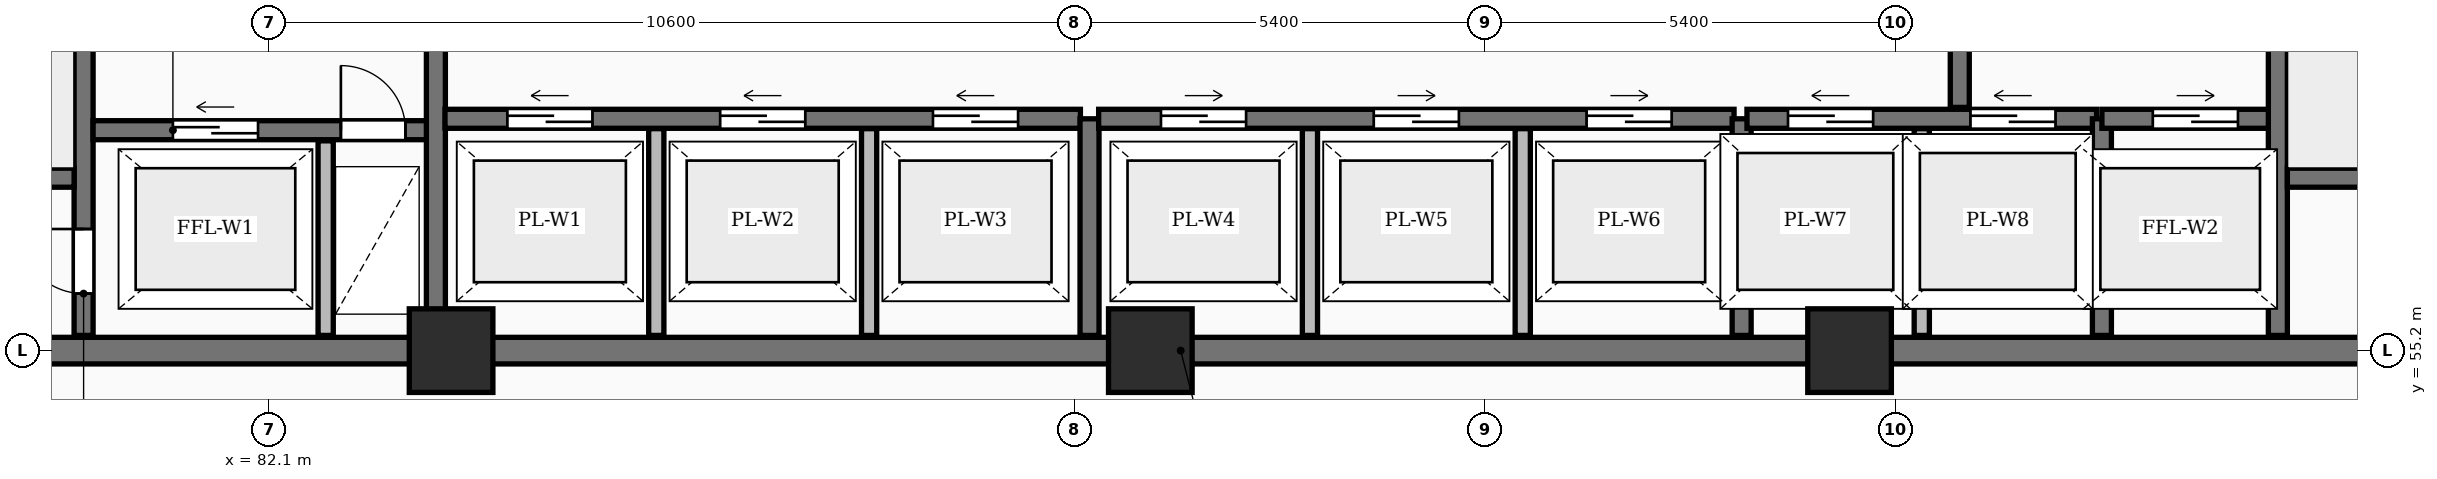
"""IFC4 building model, lengths in metres.
Left out: names, types, materials, properties, quantities, classifications, styles, units other than length and angle.
Written with IfcOpenShell. Run it as: python <this file> out.ifc"""

import sys

from ifc_helpers import new_model, si_unit, direction, frame, frame_2d, origin, origin_2d, place, context, subcontext, project, spatial, rectangle, extrude, element, fill, save


model = new_model("IFC4")
c1 = context("Model", 3, precision=1e-05, world=origin(), true_north=direction((0.0, 1.0)))
c2 = subcontext(c1, "Body", "Model", "MODEL_VIEW")
j1 = project(units=[si_unit("LENGTHUNIT", "METRE"), si_unit("PLANEANGLEUNIT", "RADIAN")], contexts=[c1])
p1 = place(None, origin())
s1 = spatial("IfcSite", under=j1, at=p1, CompositionType="ELEMENT")
p2 = place(p1, origin())
s2 = spatial("IfcBuilding", under=s1, at=p2, CompositionType="ELEMENT")
p3 = place(p2, origin())
s3 = spatial("IfcBuildingStorey", under=s2, at=p3, CompositionType="ELEMENT", Elevation=0.0)
for number, where, z_axis, x_axis in (
    (1, (84.5, 55.2, 0.0), (0.0, 0.0, 1.0), (1.0, 0.0, 0.0)),
    (2, (93.7, 55.2, 0.0), (0.0, 0.0, 1.0), (1.0, 0.0, 0.0)),
    (3, (102.9, 55.2, 0.0), (0.0, 0.0, 1.0), (1.0, 0.0, 0.0)),
):
    element("IfcColumn", number, at=place(p3, frame(where, z_axis=z_axis, x_axis=x_axis)), inside=s3, PredefinedType="COLUMN", context=c2, shape_type="SweptSolid", body=[
        extrude(rectangle(XDim=1.1, YDim=1.1, at=origin_2d()), origin(), (0.0, 0.0, 1.0), 5.4),
    ])
p4 = place(p3, frame((75.95, 55.2, 0.0), z_axis=(0.0, 0.0, 1.0), x_axis=(1.0, 0.0, 0.0)))
e4 = element("IfcWall", 4, at=p4, inside=s3, PredefinedType="SHEAR", context=c2, shape_type="SweptSolid", body=[
    extrude(rectangle(XDim=36.3, YDim=0.35, at=frame_2d((18.15, 0.0))), origin(), (0.0, 0.0, 1.0), 5.4),
])
p5 = place(p3, frame((79.665, 55.4, 0.0), z_axis=(0.0, 0.0, 1.0), x_axis=(0.0, 1.0, 0.0)))
e5 = element("IfcWall", 5, at=p5, inside=s3, PredefinedType="SHEAR", context=c2, shape_type="SweptSolid", body=[
    extrude(rectangle(XDim=11.6, YDim=0.25, at=frame_2d((5.8, 0.0))), origin(), (0.0, 0.0, 1.0), 5.4),
])
p6 = place(p5, frame((0.55, 0.0, 0.0)))
e6 = element("IfcOpeningElement", 6, at=p6, cuts=e5, PredefinedType="OPENING", context=c2, shape_type="SweptSolid", body=[
    extrude(rectangle(XDim=0.85, YDim=2.05, at=frame_2d((0.425, 1.025))), frame((0.0, 0.135, 0.0), z_axis=(0.0, -1.0, 0.0), x_axis=(1.0, 0.0, 0.0)), (0.0, 0.0, 1.0), 0.27),
])
p7 = place(p5, frame((8.4, 0.0, 0.0)))
e7 = element("IfcOpeningElement", 7, at=p7, cuts=e5, PredefinedType="OPENING", context=c2, shape_type="SweptSolid", body=[
    extrude(rectangle(XDim=1.1, YDim=2.1, at=frame_2d((0.55, 1.05))), frame((0.0, 0.135, 0.0), z_axis=(0.0, -1.0, 0.0), x_axis=(1.0, 0.0, 0.0)), (0.0, 0.0, 1.0), 0.27),
])
p8 = place(p5, frame((10.25, 0.0, 0.0)))
e8 = element("IfcOpeningElement", 8, at=p8, cuts=e5, PredefinedType="OPENING", context=c2, shape_type="SweptSolid", body=[
    extrude(rectangle(XDim=0.85, YDim=2.05, at=frame_2d((0.425, 1.025))), frame((0.0, 0.135, 0.0), z_axis=(0.0, -1.0, 0.0), x_axis=(1.0, 0.0, 0.0)), (0.0, 0.0, 1.0), 0.27),
])
p9 = place(p3, frame((76.3, 57.475, 0.0), z_axis=(0.0, 0.0, 1.0), x_axis=(1.0, 0.0, 0.0)))
e9 = element("IfcWall", 9, at=p9, inside=s3, PredefinedType="SHEAR", context=c2, shape_type="SweptSolid", body=[
    extrude(rectangle(XDim=3.24, YDim=0.25, at=frame_2d((1.62, 0.0))), origin(), (0.0, 0.0, 1.0), 5.4),
])
p10 = place(p3, frame((79.79, 58.1, 0.0), z_axis=(0.0, 0.0, 1.0), x_axis=(1.0, 0.0, 0.0)))
e10 = element("IfcWall", 10, at=p10, inside=s3, PredefinedType="SHEAR", context=c2, shape_type="SweptSolid", body=[
    extrude(rectangle(XDim=4.39, YDim=0.25, at=frame_2d((2.195, 0.0))), origin(), (0.0, 0.0, 1.0), 5.4),
])
p11 = place(p10, frame((1.05, 0.0, 0.0)))
e11 = element("IfcOpeningElement", 11, at=p11, cuts=e10, PredefinedType="OPENING", context=c2, shape_type="SweptSolid", body=[
    extrude(rectangle(XDim=1.12, YDim=2.12, at=frame_2d((0.56, 1.06))), frame((0.0, 0.135, 0.0), z_axis=(0.0, -1.0, 0.0), x_axis=(1.0, 0.0, 0.0)), (0.0, 0.0, 1.0), 0.27),
])
p12 = place(p10, frame((3.26, 0.0, 0.0)))
e12 = element("IfcOpeningElement", 12, at=p12, cuts=e10, PredefinedType="OPENING", context=c2, shape_type="SweptSolid", body=[
    extrude(rectangle(XDim=0.85, YDim=2.05, at=frame_2d((0.425, 1.025))), frame((0.0, 0.135, 0.0), z_axis=(0.0, -1.0, 0.0), x_axis=(1.0, 0.0, 0.0)), (0.0, 0.0, 1.0), 0.27),
])
p13 = place(p3, frame((82.85, 55.4, 0.0), z_axis=(0.0, 0.0, 1.0), x_axis=(0.0, 1.0, 0.0)))
e13 = element("IfcWall", 13, at=p13, inside=s3, PredefinedType="PARTITIONING", context=c2, shape_type="SweptSolid", body=[
    extrude(rectangle(XDim=2.56, YDim=0.2, at=frame_2d((1.28, 0.0))), origin(), (0.0, 0.0, 1.0), 5.1),
])
p14 = place(p3, frame((84.3, 55.4, 0.0), z_axis=(0.0, 0.0, 1.0), x_axis=(0.0, 1.0, 0.0)))
e14 = element("IfcWall", 14, at=p14, inside=s3, PredefinedType="SHEAR", context=c2, shape_type="SweptSolid", body=[
    extrude(rectangle(XDim=11.6, YDim=0.25, at=frame_2d((5.8, 0.0))), origin(), (0.0, 0.0, 1.0), 5.4),
])
p15 = place(p14, frame((5.2, 0.0, 0.0)))
e15 = element("IfcOpeningElement", 15, at=p15, cuts=e14, PredefinedType="OPENING", context=c2, shape_type="SweptSolid", body=[
    extrude(rectangle(XDim=1.1, YDim=2.1, at=frame_2d((0.55, 1.05))), frame((0.0, 0.135, 0.0), z_axis=(0.0, -1.0, 0.0), x_axis=(1.0, 0.0, 0.0)), (0.0, 0.0, 1.0), 0.27),
])
for number, where, z_axis, x_axis in (
    (16, (87.2, 55.4, 0.0), (0.0, 0.0, 1.0), (0.0, 1.0, 0.0)),
    (17, (90.0, 55.4, 0.0), (0.0, 0.0, 1.0), (0.0, 1.0, 0.0)),
):
    element("IfcWall", number, at=place(p3, frame(where, z_axis=z_axis, x_axis=x_axis)), inside=s3, PredefinedType="PARTITIONING", context=c2, shape_type="SweptSolid", body=[
        extrude(rectangle(XDim=2.72, YDim=0.2, at=frame_2d((1.36, 0.0))), origin(), (0.0, 0.0, 1.0), 5.1),
    ])
p16 = place(p3, frame((84.42, 58.25, 0.0), z_axis=(0.0, 0.0, 1.0), x_axis=(1.0, 0.0, 0.0)))
e18 = element("IfcWall", 18, at=p16, inside=s3, PredefinedType="SHEAR", context=c2, shape_type="SweptSolid", body=[
    extrude(rectangle(XDim=8.36, YDim=0.25, at=frame_2d((4.18, 0.0))), origin(), (0.0, 0.0, 1.0), 5.4),
])
p17 = place(p16, frame((0.82, 0.0, 0.0)))
e19 = element("IfcOpeningElement", 19, at=p17, cuts=e18, PredefinedType="OPENING", context=c2, shape_type="SweptSolid", body=[
    extrude(rectangle(XDim=1.12, YDim=2.12, at=frame_2d((0.56, 1.06))), frame((0.0, 0.135, 0.0), z_axis=(0.0, -1.0, 0.0), x_axis=(1.0, 0.0, 0.0)), (0.0, 0.0, 1.0), 0.27),
])
p18 = place(p16, frame((3.62, 0.0, 0.0)))
e20 = element("IfcOpeningElement", 20, at=p18, cuts=e18, PredefinedType="OPENING", context=c2, shape_type="SweptSolid", body=[
    extrude(rectangle(XDim=1.12, YDim=2.12, at=frame_2d((0.56, 1.06))), frame((0.0, 0.135, 0.0), z_axis=(0.0, -1.0, 0.0), x_axis=(1.0, 0.0, 0.0)), (0.0, 0.0, 1.0), 0.27),
])
p19 = place(p16, frame((6.42, 0.0, 0.0)))
e21 = element("IfcOpeningElement", 21, at=p19, cuts=e18, PredefinedType="OPENING", context=c2, shape_type="SweptSolid", body=[
    extrude(rectangle(XDim=1.12, YDim=2.12, at=frame_2d((0.56, 1.06))), frame((0.0, 0.135, 0.0), z_axis=(0.0, -1.0, 0.0), x_axis=(1.0, 0.0, 0.0)), (0.0, 0.0, 1.0), 0.27),
])
p20 = place(p3, frame((92.9, 55.4, 0.0), z_axis=(0.0, 0.0, 1.0), x_axis=(0.0, 1.0, 0.0)))
e22 = element("IfcWall", 22, at=p20, inside=s3, PredefinedType="SHEAR", context=c2, shape_type="SweptSolid", body=[
    extrude(rectangle(XDim=2.85, YDim=0.25, at=frame_2d((1.425, 0.0))), origin(), (0.0, 0.0, 1.0), 5.4),
])
for number, where, z_axis, x_axis in (
    (23, (95.8, 55.4, 0.0), (0.0, 0.0, 1.0), (0.0, 1.0, 0.0)),
    (24, (98.6, 55.4, 0.0), (0.0, 0.0, 1.0), (0.0, 1.0, 0.0)),
):
    element("IfcWall", number, at=place(p3, frame(where, z_axis=z_axis, x_axis=x_axis)), inside=s3, PredefinedType="PARTITIONING", context=c2, shape_type="SweptSolid", body=[
        extrude(rectangle(XDim=2.72, YDim=0.2, at=frame_2d((1.36, 0.0))), origin(), (0.0, 0.0, 1.0), 5.1),
    ])
p21 = place(p3, frame((93.02, 58.25, 0.0), z_axis=(0.0, 0.0, 1.0), x_axis=(1.0, 0.0, 0.0)))
e25 = element("IfcWall", 25, at=p21, inside=s3, PredefinedType="SHEAR", context=c2, shape_type="SweptSolid", body=[
    extrude(rectangle(XDim=8.36, YDim=0.25, at=frame_2d((4.18, 0.0))), origin(), (0.0, 0.0, 1.0), 5.4),
])
p22 = place(p21, frame((0.82, 0.0, 0.0)))
e26 = element("IfcOpeningElement", 26, at=p22, cuts=e25, PredefinedType="OPENING", context=c2, shape_type="SweptSolid", body=[
    extrude(rectangle(XDim=1.12, YDim=2.12, at=frame_2d((0.56, 1.06))), frame((0.0, 0.135, 0.0), z_axis=(0.0, -1.0, 0.0), x_axis=(1.0, 0.0, 0.0)), (0.0, 0.0, 1.0), 0.27),
])
p23 = place(p21, frame((3.62, 0.0, 0.0)))
e27 = element("IfcOpeningElement", 27, at=p23, cuts=e25, PredefinedType="OPENING", context=c2, shape_type="SweptSolid", body=[
    extrude(rectangle(XDim=1.12, YDim=2.12, at=frame_2d((0.56, 1.06))), frame((0.0, 0.135, 0.0), z_axis=(0.0, -1.0, 0.0), x_axis=(1.0, 0.0, 0.0)), (0.0, 0.0, 1.0), 0.27),
])
p24 = place(p21, frame((6.42, 0.0, 0.0)))
e28 = element("IfcOpeningElement", 28, at=p24, cuts=e25, PredefinedType="OPENING", context=c2, shape_type="SweptSolid", body=[
    extrude(rectangle(XDim=1.12, YDim=2.12, at=frame_2d((0.56, 1.06))), frame((0.0, 0.135, 0.0), z_axis=(0.0, -1.0, 0.0), x_axis=(1.0, 0.0, 0.0)), (0.0, 0.0, 1.0), 0.27),
])
p25 = place(p3, frame((101.48, 55.4, 0.0), z_axis=(0.0, 0.0, 1.0), x_axis=(0.0, 1.0, 0.0)))
e29 = element("IfcWall", 29, at=p25, inside=s3, PredefinedType="SHEAR", context=c2, shape_type="SweptSolid", body=[
    extrude(rectangle(XDim=2.85, YDim=0.25, at=frame_2d((1.425, 0.0))), origin(), (0.0, 0.0, 1.0), 5.4),
])
p26 = place(p3, frame((103.85, 55.4, 0.0), z_axis=(0.0, 0.0, 1.0), x_axis=(0.0, 1.0, 0.0)))
e30 = element("IfcWall", 30, at=p26, inside=s3, PredefinedType="PARTITIONING", context=c2, shape_type="SweptSolid", body=[
    extrude(rectangle(XDim=2.72, YDim=0.2, at=frame_2d((1.36, 0.0))), origin(), (0.0, 0.0, 1.0), 5.1),
])
p27 = place(p3, frame((101.55, 58.25, 0.0), z_axis=(0.0, 0.0, 1.0), x_axis=(1.0, 0.0, 0.0)))
e31 = element("IfcWall", 31, at=p27, inside=s3, PredefinedType="SHEAR", context=c2, shape_type="SweptSolid", body=[
    extrude(rectangle(XDim=4.6, YDim=0.25, at=frame_2d((2.3, 0.0))), origin(), (0.0, 0.0, 1.0), 5.4),
])
p28 = place(p27, frame((0.54, 0.0, 0.0)))
e32 = element("IfcOpeningElement", 32, at=p28, cuts=e31, PredefinedType="OPENING", context=c2, shape_type="SweptSolid", body=[
    extrude(rectangle(XDim=1.12, YDim=2.12, at=frame_2d((0.56, 1.06))), frame((0.0, 0.135, 0.0), z_axis=(0.0, -1.0, 0.0), x_axis=(1.0, 0.0, 0.0)), (0.0, 0.0, 1.0), 0.27),
])
p29 = place(p27, frame((2.94, 0.0, 0.0)))
e33 = element("IfcOpeningElement", 33, at=p29, cuts=e31, PredefinedType="OPENING", context=c2, shape_type="SweptSolid", body=[
    extrude(rectangle(XDim=1.12, YDim=2.12, at=frame_2d((0.56, 1.06))), frame((0.0, 0.135, 0.0), z_axis=(0.0, -1.0, 0.0), x_axis=(1.0, 0.0, 0.0)), (0.0, 0.0, 1.0), 0.27),
])
p30 = place(p3, frame((106.22, 55.4, 0.0), z_axis=(0.0, 0.0, 1.0), x_axis=(0.0, 1.0, 0.0)))
e34 = element("IfcWall", 34, at=p30, inside=s3, PredefinedType="SHEAR", context=c2, shape_type="SweptSolid", body=[
    extrude(rectangle(XDim=2.85, YDim=0.25, at=frame_2d((1.425, 0.0))), origin(), (0.0, 0.0, 1.0), 5.4),
])
p31 = place(p3, frame((106.22, 58.25, 0.0), z_axis=(0.0, 0.0, 1.0), x_axis=(1.0, 0.0, 0.0)))
e35 = element("IfcWall", 35, at=p31, inside=s3, PredefinedType="SHEAR", context=c2, shape_type="SweptSolid", body=[
    extrude(rectangle(XDim=2.46, YDim=0.25, at=frame_2d((1.23, 0.0))), origin(), (0.0, 0.0, 1.0), 5.4),
])
p32 = place(p31, frame((0.67, 0.0, 0.0)))
e36 = element("IfcOpeningElement", 36, at=p32, cuts=e35, PredefinedType="OPENING", context=c2, shape_type="SweptSolid", body=[
    extrude(rectangle(XDim=1.12, YDim=2.12, at=frame_2d((0.56, 1.06))), frame((0.0, 0.135, 0.0), z_axis=(0.0, -1.0, 0.0), x_axis=(1.0, 0.0, 0.0)), (0.0, 0.0, 1.0), 0.27),
])
p33 = place(p3, frame((104.35, 58.4, 0.0), z_axis=(0.0, 0.0, 1.0), x_axis=(0.0, 1.0, 0.0)))
e37 = element("IfcWall", 37, at=p33, inside=s3, PredefinedType="SHEAR", context=c2, shape_type="SweptSolid", body=[
    extrude(rectangle(XDim=8.6, YDim=0.25, at=frame_2d((4.3, 0.0))), origin(), (0.0, 0.0, 1.0), 5.4),
])
p34 = place(p33, frame((1.8, 0.0, 0.0)))
e38 = element("IfcOpeningElement", 38, at=p34, cuts=e37, PredefinedType="OPENING", context=c2, shape_type="SweptSolid", body=[
    extrude(rectangle(XDim=1.1, YDim=2.1, at=frame_2d((0.55, 1.05))), frame((0.0, 0.135, 0.0), z_axis=(0.0, -1.0, 0.0), x_axis=(1.0, 0.0, 0.0)), (0.0, 0.0, 1.0), 0.27),
])
p35 = place(p3, frame((108.535, 55.4, 0.0), z_axis=(0.0, 0.0, 1.0), x_axis=(0.0, 1.0, 0.0)))
e39 = element("IfcWall", 39, at=p35, inside=s3, PredefinedType="SHEAR", context=c2, shape_type="SweptSolid", body=[
    extrude(rectangle(XDim=11.6, YDim=0.25, at=frame_2d((5.8, 0.0))), origin(), (0.0, 0.0, 1.0), 5.4),
])
p36 = place(p35, frame((8.2, 0.0, 0.0)))
e40 = element("IfcOpeningElement", 40, at=p36, cuts=e39, PredefinedType="OPENING", context=c2, shape_type="SweptSolid", body=[
    extrude(rectangle(XDim=1.1, YDim=2.1, at=frame_2d((0.55, 1.05))), frame((0.0, 0.135, 0.0), z_axis=(0.0, -1.0, 0.0), x_axis=(1.0, 0.0, 0.0)), (0.0, 0.0, 1.0), 0.27),
])
p37 = place(p35, frame((10.25, 0.0, 0.0)))
e41 = element("IfcOpeningElement", 41, at=p37, cuts=e39, PredefinedType="OPENING", context=c2, shape_type="SweptSolid", body=[
    extrude(rectangle(XDim=0.85, YDim=2.05, at=frame_2d((0.425, 1.025))), frame((0.0, 0.135, 0.0), z_axis=(0.0, -1.0, 0.0), x_axis=(1.0, 0.0, 0.0)), (0.0, 0.0, 1.0), 0.27),
])
p38 = place(p3, frame((108.66, 57.475, 0.0), z_axis=(0.0, 0.0, 1.0), x_axis=(1.0, 0.0, 0.0)))
e42 = element("IfcWall", 42, at=p38, inside=s3, PredefinedType="SHEAR", context=c2, shape_type="SweptSolid", body=[
    extrude(rectangle(XDim=3.24, YDim=0.25, at=frame_2d((1.62, 0.0))), origin(), (0.0, 0.0, 1.0), 5.4),
])
p39 = place(p6, origin())
e43 = element("IfcDoor", 43, at=p39, inside=s3, OperationType="SINGLE_SWING_RIGHT", PredefinedType="DOOR", context=c2, shape_type="SweptSolid", body=[
    extrude(rectangle(XDim=0.85, YDim=2.05, at=frame_2d((0.425, 1.025))), frame((0.0, 0.025, 0.0), z_axis=(0.0, -1.0, 0.0), x_axis=(1.0, 0.0, 0.0)), (0.0, 0.0, 1.0), 0.05),
])
fill(e6, e43)
p40 = place(p11, origin())
e44 = element("IfcDoor", 44, at=p40, inside=s3, OperationType="SLIDING_TO_LEFT", PredefinedType="DOOR", context=c2, shape_type="SweptSolid", body=[
    extrude(rectangle(XDim=1.12, YDim=2.12, at=frame_2d((0.56, 1.06))), frame((0.0, 0.025, 0.0), z_axis=(0.0, -1.0, 0.0), x_axis=(1.0, 0.0, 0.0)), (0.0, 0.0, 1.0), 0.05),
])
fill(e11, e44)
p41 = place(p12, origin())
e45 = element("IfcDoor", 45, at=p41, inside=s3, OperationType="SINGLE_SWING_LEFT", PredefinedType="DOOR", context=c2, shape_type="SweptSolid", body=[
    extrude(rectangle(XDim=0.85, YDim=2.05, at=frame_2d((0.425, 1.025))), frame((0.0, 0.025, 0.0), z_axis=(0.0, -1.0, 0.0), x_axis=(1.0, 0.0, 0.0)), (0.0, 0.0, 1.0), 0.05),
])
fill(e12, e45)
p42 = place(p17, origin())
e46 = element("IfcDoor", 46, at=p42, inside=s3, OperationType="SLIDING_TO_LEFT", PredefinedType="DOOR", context=c2, shape_type="SweptSolid", body=[
    extrude(rectangle(XDim=1.12, YDim=2.12, at=frame_2d((0.56, 1.06))), frame((0.0, 0.025, 0.0), z_axis=(0.0, -1.0, 0.0), x_axis=(1.0, 0.0, 0.0)), (0.0, 0.0, 1.0), 0.05),
])
fill(e19, e46)
p43 = place(p18, origin())
e47 = element("IfcDoor", 47, at=p43, inside=s3, OperationType="SLIDING_TO_LEFT", PredefinedType="DOOR", context=c2, shape_type="SweptSolid", body=[
    extrude(rectangle(XDim=1.12, YDim=2.12, at=frame_2d((0.56, 1.06))), frame((0.0, 0.025, 0.0), z_axis=(0.0, -1.0, 0.0), x_axis=(1.0, 0.0, 0.0)), (0.0, 0.0, 1.0), 0.05),
])
fill(e20, e47)
p44 = place(p19, origin())
e48 = element("IfcDoor", 48, at=p44, inside=s3, OperationType="SLIDING_TO_LEFT", PredefinedType="DOOR", context=c2, shape_type="SweptSolid", body=[
    extrude(rectangle(XDim=1.12, YDim=2.12, at=frame_2d((0.56, 1.06))), frame((0.0, 0.025, 0.0), z_axis=(0.0, -1.0, 0.0), x_axis=(1.0, 0.0, 0.0)), (0.0, 0.0, 1.0), 0.05),
])
fill(e21, e48)
p45 = place(p22, origin())
e49 = element("IfcDoor", 49, at=p45, inside=s3, OperationType="SLIDING_TO_RIGHT", PredefinedType="DOOR", context=c2, shape_type="SweptSolid", body=[
    extrude(rectangle(XDim=1.12, YDim=2.12, at=frame_2d((0.56, 1.06))), frame((0.0, 0.025, 0.0), z_axis=(0.0, -1.0, 0.0), x_axis=(1.0, 0.0, 0.0)), (0.0, 0.0, 1.0), 0.05),
])
fill(e26, e49)
p46 = place(p23, origin())
e50 = element("IfcDoor", 50, at=p46, inside=s3, OperationType="SLIDING_TO_RIGHT", PredefinedType="DOOR", context=c2, shape_type="SweptSolid", body=[
    extrude(rectangle(XDim=1.12, YDim=2.12, at=frame_2d((0.56, 1.06))), frame((0.0, 0.025, 0.0), z_axis=(0.0, -1.0, 0.0), x_axis=(1.0, 0.0, 0.0)), (0.0, 0.0, 1.0), 0.05),
])
fill(e27, e50)
p47 = place(p24, origin())
e51 = element("IfcDoor", 51, at=p47, inside=s3, OperationType="SLIDING_TO_RIGHT", PredefinedType="DOOR", context=c2, shape_type="SweptSolid", body=[
    extrude(rectangle(XDim=1.12, YDim=2.12, at=frame_2d((0.56, 1.06))), frame((0.0, 0.025, 0.0), z_axis=(0.0, -1.0, 0.0), x_axis=(1.0, 0.0, 0.0)), (0.0, 0.0, 1.0), 0.05),
])
fill(e28, e51)
p48 = place(p28, origin())
e52 = element("IfcDoor", 52, at=p48, inside=s3, OperationType="SLIDING_TO_LEFT", PredefinedType="DOOR", context=c2, shape_type="SweptSolid", body=[
    extrude(rectangle(XDim=1.12, YDim=2.12, at=frame_2d((0.56, 1.06))), frame((0.0, 0.025, 0.0), z_axis=(0.0, -1.0, 0.0), x_axis=(1.0, 0.0, 0.0)), (0.0, 0.0, 1.0), 0.05),
])
fill(e32, e52)
p49 = place(p29, origin())
e53 = element("IfcDoor", 53, at=p49, inside=s3, OperationType="SLIDING_TO_LEFT", PredefinedType="DOOR", context=c2, shape_type="SweptSolid", body=[
    extrude(rectangle(XDim=1.12, YDim=2.12, at=frame_2d((0.56, 1.06))), frame((0.0, 0.025, 0.0), z_axis=(0.0, -1.0, 0.0), x_axis=(1.0, 0.0, 0.0)), (0.0, 0.0, 1.0), 0.05),
])
fill(e33, e53)
p50 = place(p32, origin())
e54 = element("IfcDoor", 54, at=p50, inside=s3, OperationType="SLIDING_TO_RIGHT", PredefinedType="DOOR", context=c2, shape_type="SweptSolid", body=[
    extrude(rectangle(XDim=1.12, YDim=2.12, at=frame_2d((0.56, 1.06))), frame((0.0, 0.025, 0.0), z_axis=(0.0, -1.0, 0.0), x_axis=(1.0, 0.0, 0.0)), (0.0, 0.0, 1.0), 0.05),
])
fill(e36, e54)
save(model, sys.argv[1])
